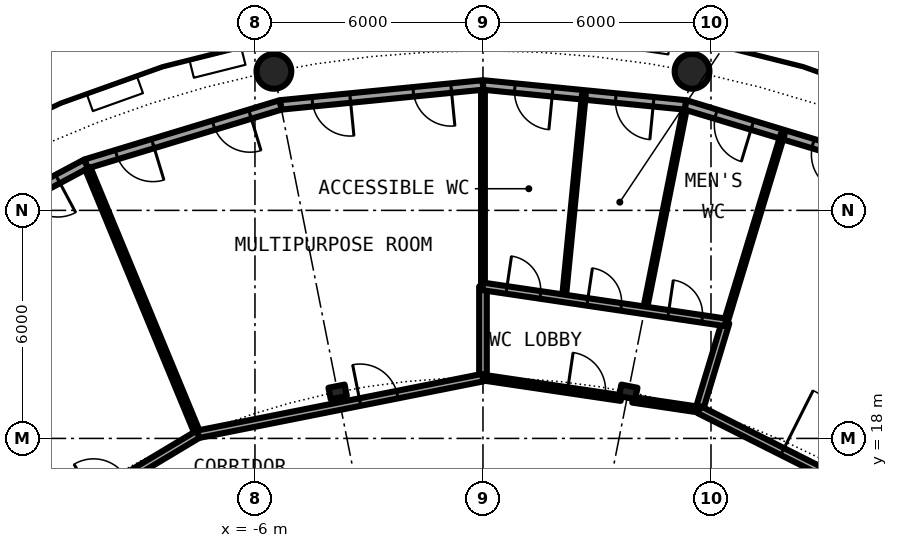
"""IFC4 building model, lengths in metres.
Left out: names, types, materials, properties, quantities, classifications, styles, units other than length and angle.
Written with IfcOpenShell. Run it as: python <this file> out.ifc"""

import sys

from ifc_helpers import new_model, si_unit, direction, frame, frame_2d, origin, origin_2d, place, context, subcontext, project, spatial, rectangle, hollow_circle, i_section, extrude, element, fill, save


model = new_model("IFC4")
c1 = context("Model", 3, precision=1e-05, world=origin(), true_north=direction((0.0, 1.0)))
c2 = subcontext(c1, "Body", "Model", "MODEL_VIEW")
j1 = project(units=[si_unit("LENGTHUNIT", "METRE"), si_unit("PLANEANGLEUNIT", "RADIAN")], contexts=[c1])
p1 = place(None, origin())
s1 = spatial("IfcSite", under=j1, at=p1, CompositionType="ELEMENT")
p2 = place(p1, origin())
s2 = spatial("IfcBuilding", under=s1, at=p2, CompositionType="ELEMENT")
p3 = place(p2, frame((0.0, 0.0, 107.45)))
s3 = spatial("IfcBuildingStorey", under=s2, at=p3, CompositionType="ELEMENT", Elevation=107.45)
for number, where, z_axis, x_axis in (
    (1, (5.501, 27.658, 0.0), (0.0, 0.0, 1.0), (1.0, 0.0, 0.0)),
    (2, (-5.501, 27.658, 0.0), (0.0, 0.0, 1.0), (1.0, 0.0, 0.0)),
):
    element("IfcColumn", number, at=place(p3, frame(where, z_axis=z_axis, x_axis=x_axis)), inside=s3, PredefinedType="COLUMN", context=c2, shape_type="SweptSolid", body=[
        extrude(hollow_circle(Radius=0.457, WallThickness=0.04, at=origin_2d()), origin(), (0.0, 0.0, 1.0), 4.2),
    ])
for number, where, z_axis, x_axis in (
    (3, (3.824, 19.223, 0.0), (0.0, 0.0, 1.0), (0.195, 0.981, 0.0)),
    (4, (-3.824, 19.223, 0.0), (0.0, 0.0, 1.0), (-0.195, 0.981, 0.0)),
):
    element("IfcColumn", number, at=place(p3, frame(where, z_axis=z_axis, x_axis=x_axis)), inside=s3, PredefinedType="COLUMN", context=c2, shape_type="SweptSolid", body=[
        extrude(i_section(OverallWidth=0.307, OverallDepth=0.432, WebThickness=0.021, FlangeThickness=0.04, FilletRadius=0.027, at=origin_2d()), origin(), (0.0, 0.0, 1.0), 4.2),
    ])
p4 = place(p3, frame((10.447, 25.222, 0.0), z_axis=(0.0, 0.0, 1.0), x_axis=(-0.956965678721, 0.290201119486, 0.0)))
e5 = element("IfcWall", 5, at=p4, inside=s3, PredefinedType="SOLIDWALL", context=c2, shape_type="SweptSolid", body=[
    extrude(rectangle(XDim=5.351, YDim=0.25, at=frame_2d((2.676, 0.0))), origin(), (0.0, 0.0, 1.0), 3.85),
])
p5 = place(p4, frame((0.841, 0.0, 0.0)))
e6 = element("IfcOpeningElement", 6, at=p5, cuts=e5, PredefinedType="OPENING", context=c2, shape_type="SweptSolid", body=[
    extrude(rectangle(XDim=1.0, YDim=2.2, at=frame_2d((0.5, 1.1))), frame((0.0, 0.135, 0.0), z_axis=(0.0, -1.0, 0.0), x_axis=(1.0, 0.0, 0.0)), (0.0, 0.0, 1.0), 0.27),
])
p6 = place(p4, frame((3.51, 0.0, 0.0)))
e7 = element("IfcOpeningElement", 7, at=p6, cuts=e5, PredefinedType="OPENING", context=c2, shape_type="SweptSolid", body=[
    extrude(rectangle(XDim=1.0, YDim=2.2, at=frame_2d((0.5, 1.1))), frame((0.0, 0.135, 0.0), z_axis=(0.0, -1.0, 0.0), x_axis=(1.0, 0.0, 0.0)), (0.0, 0.0, 1.0), 0.27),
])
p7 = place(p3, frame((5.326, 26.775, 0.0), z_axis=(0.0, 0.0, 1.0), x_axis=(-0.995173996315, 0.098126026407, 0.0)))
e8 = element("IfcWall", 8, at=p7, inside=s3, PredefinedType="SOLIDWALL", context=c2, shape_type="SweptSolid", body=[
    extrude(rectangle(XDim=5.352, YDim=0.25, at=frame_2d((2.676, 0.0))), origin(), (0.0, 0.0, 1.0), 3.85),
])
p8 = place(p7, frame((0.841, 0.0, 0.0)))
e9 = element("IfcOpeningElement", 9, at=p8, cuts=e8, PredefinedType="OPENING", context=c2, shape_type="SweptSolid", body=[
    extrude(rectangle(XDim=1.0, YDim=2.2, at=frame_2d((0.5, 1.1))), frame((0.0, 0.135, 0.0), z_axis=(0.0, -1.0, 0.0), x_axis=(1.0, 0.0, 0.0)), (0.0, 0.0, 1.0), 0.27),
])
p9 = place(p7, frame((3.51, 0.0, 0.0)))
e10 = element("IfcOpeningElement", 10, at=p9, cuts=e8, PredefinedType="OPENING", context=c2, shape_type="SweptSolid", body=[
    extrude(rectangle(XDim=1.0, YDim=2.2, at=frame_2d((0.5, 1.1))), frame((0.0, 0.135, 0.0), z_axis=(0.0, -1.0, 0.0), x_axis=(1.0, 0.0, 0.0)), (0.0, 0.0, 1.0), 0.27),
])
p10 = place(p3, frame((0.0, 27.3, 0.0), z_axis=(0.0, 0.0, 1.0), x_axis=(-0.995173996315, -0.098126026407, 0.0)))
e11 = element("IfcWall", 11, at=p10, inside=s3, PredefinedType="SOLIDWALL", context=c2, shape_type="SweptSolid", body=[
    extrude(rectangle(XDim=5.352, YDim=0.25, at=frame_2d((2.676, 0.0))), origin(), (0.0, 0.0, 1.0), 3.85),
])
p11 = place(p10, frame((0.841, 0.0, 0.0)))
e12 = element("IfcOpeningElement", 12, at=p11, cuts=e11, PredefinedType="OPENING", context=c2, shape_type="SweptSolid", body=[
    extrude(rectangle(XDim=1.0, YDim=2.2, at=frame_2d((0.5, 1.1))), frame((0.0, 0.135, 0.0), z_axis=(0.0, -1.0, 0.0), x_axis=(1.0, 0.0, 0.0)), (0.0, 0.0, 1.0), 0.27),
])
p12 = place(p10, frame((3.51, 0.0, 0.0)))
e13 = element("IfcOpeningElement", 13, at=p12, cuts=e11, PredefinedType="OPENING", context=c2, shape_type="SweptSolid", body=[
    extrude(rectangle(XDim=1.0, YDim=2.2, at=frame_2d((0.5, 1.1))), frame((0.0, 0.135, 0.0), z_axis=(0.0, -1.0, 0.0), x_axis=(1.0, 0.0, 0.0)), (0.0, 0.0, 1.0), 0.27),
])
p13 = place(p3, frame((-5.326, 26.775, 0.0), z_axis=(0.0, 0.0, 1.0), x_axis=(-0.956965678721, -0.290201119486, 0.0)))
e14 = element("IfcWall", 14, at=p13, inside=s3, PredefinedType="SOLIDWALL", context=c2, shape_type="SweptSolid", body=[
    extrude(rectangle(XDim=5.351, YDim=0.25, at=frame_2d((2.676, 0.0))), origin(), (0.0, 0.0, 1.0), 3.85),
])
p14 = place(p13, frame((0.841, 0.0, 0.0)))
e15 = element("IfcOpeningElement", 15, at=p14, cuts=e14, PredefinedType="OPENING", context=c2, shape_type="SweptSolid", body=[
    extrude(rectangle(XDim=1.0, YDim=2.2, at=frame_2d((0.5, 1.1))), frame((0.0, 0.135, 0.0), z_axis=(0.0, -1.0, 0.0), x_axis=(1.0, 0.0, 0.0)), (0.0, 0.0, 1.0), 0.27),
])
p15 = place(p13, frame((3.51, 0.0, 0.0)))
e16 = element("IfcOpeningElement", 16, at=p15, cuts=e14, PredefinedType="OPENING", context=c2, shape_type="SweptSolid", body=[
    extrude(rectangle(XDim=1.0, YDim=2.2, at=frame_2d((0.5, 1.1))), frame((0.0, 0.135, 0.0), z_axis=(0.0, -1.0, 0.0), x_axis=(1.0, 0.0, 0.0)), (0.0, 0.0, 1.0), 0.27),
])
p16 = place(p3, frame((-10.447, 25.222, 0.0), z_axis=(0.0, 0.0, 1.0), x_axis=(-0.881915646801, -0.471407246368, 0.0)))
e17 = element("IfcWall", 17, at=p16, inside=s3, PredefinedType="SOLIDWALL", context=c2, shape_type="SweptSolid", body=[
    extrude(rectangle(XDim=5.352, YDim=0.25, at=frame_2d((2.676, 0.0))), origin(), (0.0, 0.0, 1.0), 3.85),
])
p17 = place(p16, frame((0.841, 0.0, 0.0)))
e18 = element("IfcOpeningElement", 18, at=p17, cuts=e17, PredefinedType="OPENING", context=c2, shape_type="SweptSolid", body=[
    extrude(rectangle(XDim=1.0, YDim=2.2, at=frame_2d((0.5, 1.1))), frame((0.0, 0.135, 0.0), z_axis=(0.0, -1.0, 0.0), x_axis=(1.0, 0.0, 0.0)), (0.0, 0.0, 1.0), 0.27),
])
p18 = place(p16, frame((3.51, 0.0, 0.0)))
e19 = element("IfcOpeningElement", 19, at=p18, cuts=e17, PredefinedType="OPENING", context=c2, shape_type="SweptSolid", body=[
    extrude(rectangle(XDim=1.0, YDim=2.2, at=frame_2d((0.5, 1.1))), frame((0.0, 0.135, 0.0), z_axis=(0.0, -1.0, 0.0), x_axis=(1.0, 0.0, 0.0)), (0.0, 0.0, 1.0), 0.27),
])
p19 = place(p3, frame((-10.399, 25.106, 0.0), z_axis=(0.0, 0.0, 1.0), x_axis=(0.382600411313, -0.923913916587, 0.0)))
e20 = element("IfcWall", 20, at=p19, inside=s3, PredefinedType="PARTITIONING", context=c2, shape_type="SweptSolid", body=[
    extrude(rectangle(XDim=7.574, YDim=0.15, at=frame_2d((3.787, 0.0))), origin(), (0.0, 0.0, 1.0), 3.85),
])
p20 = place(p3, frame((0.0, 19.6, 0.0), z_axis=(0.0, 0.0, 1.0), x_axis=(0.0, 1.0, 0.0)))
e21 = element("IfcWall", 21, at=p20, inside=s3, PredefinedType="PARTITIONING", context=c2, shape_type="SweptSolid", body=[
    extrude(rectangle(XDim=2.4, YDim=0.2, at=frame_2d((1.2, 0.0))), origin(), (0.0, 0.0, 1.0), 3.85),
])
p21 = place(p3, frame((0.0, 22.0, 0.0), z_axis=(0.0, 0.0, 1.0), x_axis=(0.0, 1.0, 0.0)))
e22 = element("IfcWall", 22, at=p21, inside=s3, PredefinedType="PARTITIONING", context=c2, shape_type="SweptSolid", body=[
    extrude(rectangle(XDim=5.175, YDim=0.1, at=frame_2d((2.587, 0.0))), origin(), (0.0, 0.0, 1.0), 3.85),
])
p22 = place(p3, frame((2.129, 21.684, 0.0), z_axis=(0.0, 0.0, 1.0), x_axis=(0.09767265114, 0.995218595696, 0.0)))
e23 = element("IfcWall", 23, at=p22, inside=s3, PredefinedType="PARTITIONING", context=c2, shape_type="SweptSolid", body=[
    extrude(rectangle(XDim=5.386, YDim=0.1, at=frame_2d((2.693, 0.0))), origin(), (0.0, 0.0, 1.0), 3.85),
])
p23 = place(p3, frame((4.258, 21.368, 0.0), z_axis=(0.0, 0.0, 1.0), x_axis=(0.195296766469, 0.980744193461, 0.0)))
e24 = element("IfcWall", 24, at=p23, inside=s3, PredefinedType="PARTITIONING", context=c2, shape_type="SweptSolid", body=[
    extrude(rectangle(XDim=5.387, YDim=0.1, at=frame_2d((2.693, 0.0))), origin(), (0.0, 0.0, 1.0), 3.85),
])
p24 = place(p3, frame((5.69, 18.756, 0.0), z_axis=(0.0, 0.0, 1.0), x_axis=(0.290015865164, 0.957021837762, 0.0)))
e25 = element("IfcWall", 25, at=p24, inside=s3, PredefinedType="PARTITIONING", context=c2, shape_type="SweptSolid", body=[
    extrude(rectangle(XDim=2.4, YDim=0.2, at=frame_2d((1.2, 0.0))), origin(), (0.0, 0.0, 1.0), 3.85),
])
p25 = place(p3, frame((6.386, 21.053, 0.0), z_axis=(0.0, 0.0, 1.0), x_axis=(0.29025094386, 0.956950567996, 0.0)))
e26 = element("IfcWall", 26, at=p25, inside=s3, PredefinedType="PARTITIONING", context=c2, shape_type="SweptSolid", body=[
    extrude(rectangle(XDim=5.175, YDim=0.1, at=frame_2d((2.587, 0.0))), origin(), (0.0, 0.0, 1.0), 3.85),
])
p26 = place(p3, frame((-7.501, 18.108, 0.0), z_axis=(0.0, 0.0, 1.0), x_axis=(0.980781515054, 0.195109250749, 0.0)))
e27 = element("IfcWall", 27, at=p26, inside=s3, PredefinedType="PARTITIONING", context=c2, shape_type="SweptSolid", body=[
    extrude(rectangle(XDim=7.648, YDim=0.2, at=frame_2d((3.824, 0.0))), origin(), (0.0, 0.0, 1.0), 3.54),
])
p27 = place(p26, frame((4.35, 0.0, 0.0)))
e28 = element("IfcOpeningElement", 28, at=p27, cuts=e27, PredefinedType="OPENING", context=c2, shape_type="SweptSolid", body=[
    extrude(rectangle(XDim=1.0, YDim=2.3, at=frame_2d((0.5, 1.15))), frame((0.0, 0.11, 0.0), z_axis=(0.0, -1.0, 0.0), x_axis=(1.0, 0.0, 0.0)), (0.0, 0.0, 1.0), 0.22),
])
p28 = place(p3, frame((5.69, 18.756, 0.0), z_axis=(0.0, 0.0, 1.0), x_axis=(0.893207084241, -0.449645532239, 0.0)))
e29 = element("IfcWall", 29, at=p28, inside=s3, PredefinedType="PARTITIONING", context=c2, shape_type="SweptSolid", body=[
    extrude(rectangle(XDim=5.578, YDim=0.2, at=frame_2d((2.789, 0.0))), origin(), (0.0, 0.0, 1.0), 3.54),
])
p29 = place(p28, frame((2.451, 0.0, 0.0)))
e30 = element("IfcOpeningElement", 30, at=p29, cuts=e29, PredefinedType="OPENING", context=c2, shape_type="SweptSolid", body=[
    extrude(rectangle(XDim=1.8, YDim=2.3, at=frame_2d((0.9, 1.15))), frame((0.0, 0.11, 0.0), z_axis=(0.0, -1.0, 0.0), x_axis=(1.0, 0.0, 0.0)), (0.0, 0.0, 1.0), 0.22),
])
p30 = place(p3, frame((-10.653, 16.219, 0.0), z_axis=(0.0, 0.0, 1.0), x_axis=(0.857774179698, 0.514026708103, 0.0)))
e31 = element("IfcWall", 31, at=p30, inside=s3, PredefinedType="PARTITIONING", context=c2, shape_type="SweptSolid", body=[
    extrude(rectangle(XDim=3.675, YDim=0.2, at=frame_2d((1.837, 0.0))), origin(), (0.0, 0.0, 1.0), 3.54),
])
p31 = place(p30, frame((0.473, 0.0, 0.0)))
e32 = element("IfcOpeningElement", 32, at=p31, cuts=e31, PredefinedType="OPENING", context=c2, shape_type="SweptSolid", body=[
    extrude(rectangle(XDim=1.0, YDim=2.3, at=frame_2d((0.5, 1.15))), frame((0.0, 0.11, 0.0), z_axis=(0.0, -1.0, 0.0), x_axis=(1.0, 0.0, 0.0)), (0.0, 0.0, 1.0), 0.22),
])
p32 = place(p3, frame((0.0, 19.6, 0.0), z_axis=(0.0, 0.0, 1.0), x_axis=(0.989182049247, -0.146693126787, 0.0)))
e33 = element("IfcWall", 33, at=p32, inside=s3, PredefinedType="PARTITIONING", context=c2, shape_type="SweptSolid", body=[
    extrude(rectangle(XDim=3.675, YDim=0.15, at=frame_2d((1.837, 0.0))), origin(), (0.0, 0.0, 1.0), 3.54),
])
p33 = place(p32, frame((2.25, 0.0, 0.0)))
e34 = element("IfcOpeningElement", 34, at=p33, cuts=e33, PredefinedType="OPENING", context=c2, shape_type="SweptSolid", body=[
    extrude(rectangle(XDim=1.0, YDim=2.3, at=frame_2d((0.5, 1.15))), frame((0.0, 0.085, 0.0), z_axis=(0.0, -1.0, 0.0), x_axis=(1.0, 0.0, 0.0)), (0.0, 0.0, 1.0), 0.17),
])
p34 = place(p3, frame((3.939, 19.016, 0.0), z_axis=(0.0, 0.0, 1.0), x_axis=(0.989153791914, -0.146883545509, 0.0)))
e35 = element("IfcWall", 35, at=p34, inside=s3, PredefinedType="PARTITIONING", context=c2, shape_type="SweptSolid", body=[
    extrude(rectangle(XDim=1.77, YDim=0.15, at=frame_2d((0.885, 0.0))), origin(), (0.0, 0.0, 1.0), 3.54),
])
p35 = place(p3, frame((-0.009, 22.0, 0.0), z_axis=(0.0, 0.0, 1.0), x_axis=(0.989212179465, -0.146489808511, 0.0)))
e36 = element("IfcWall", 36, at=p35, inside=s3, PredefinedType="PARTITIONING", context=c2, shape_type="SweptSolid", body=[
    extrude(rectangle(XDim=6.465, YDim=0.2, at=frame_2d((3.232, 0.0))), origin(), (0.0, 0.0, 1.0), 3.85),
])
p36 = place(p35, frame((4.939, 0.0, 0.0)))
e37 = element("IfcOpeningElement", 37, at=p36, cuts=e36, PredefinedType="OPENING", context=c2, shape_type="SweptSolid", body=[
    extrude(rectangle(XDim=0.9, YDim=2.3, at=frame_2d((0.45, 1.15))), frame((0.0, 0.11, 0.0), z_axis=(0.0, -1.0, 0.0), x_axis=(1.0, 0.0, 0.0)), (0.0, 0.0, 1.0), 0.22),
])
p37 = place(p35, frame((2.787, 0.0, 0.0)))
e38 = element("IfcOpeningElement", 38, at=p37, cuts=e36, PredefinedType="OPENING", context=c2, shape_type="SweptSolid", body=[
    extrude(rectangle(XDim=0.9, YDim=2.3, at=frame_2d((0.45, 1.15))), frame((0.0, 0.11, 0.0), z_axis=(0.0, -1.0, 0.0), x_axis=(1.0, 0.0, 0.0)), (0.0, 0.0, 1.0), 0.22),
])
p38 = place(p35, frame((0.635, 0.0, 0.0)))
e39 = element("IfcOpeningElement", 39, at=p38, cuts=e36, PredefinedType="OPENING", context=c2, shape_type="SweptSolid", body=[
    extrude(rectangle(XDim=0.9, YDim=2.3, at=frame_2d((0.45, 1.15))), frame((0.0, 0.11, 0.0), z_axis=(0.0, -1.0, 0.0), x_axis=(1.0, 0.0, 0.0)), (0.0, 0.0, 1.0), 0.22),
])
p39 = place(p5, origin())
e40 = element("IfcDoor", 40, at=p39, inside=s3, OperationType="SINGLE_SWING_LEFT", PredefinedType="DOOR", context=c2, shape_type="SweptSolid", body=[
    extrude(rectangle(XDim=1.0, YDim=2.2, at=frame_2d((0.5, 1.1))), frame((0.0, 0.025, 0.0), z_axis=(0.0, -1.0, 0.0), x_axis=(1.0, 0.0, 0.0)), (0.0, 0.0, 1.0), 0.05),
])
fill(e6, e40)
p40 = place(p6, origin())
e41 = element("IfcDoor", 41, at=p40, inside=s3, OperationType="SINGLE_SWING_LEFT", PredefinedType="DOOR", context=c2, shape_type="SweptSolid", body=[
    extrude(rectangle(XDim=1.0, YDim=2.2, at=frame_2d((0.5, 1.1))), frame((0.0, 0.025, 0.0), z_axis=(0.0, -1.0, 0.0), x_axis=(1.0, 0.0, 0.0)), (0.0, 0.0, 1.0), 0.05),
])
fill(e7, e41)
p41 = place(p8, origin())
e42 = element("IfcDoor", 42, at=p41, inside=s3, OperationType="SINGLE_SWING_LEFT", PredefinedType="DOOR", context=c2, shape_type="SweptSolid", body=[
    extrude(rectangle(XDim=1.0, YDim=2.2, at=frame_2d((0.5, 1.1))), frame((0.0, 0.025, 0.0), z_axis=(0.0, -1.0, 0.0), x_axis=(1.0, 0.0, 0.0)), (0.0, 0.0, 1.0), 0.05),
])
fill(e9, e42)
p42 = place(p9, origin())
e43 = element("IfcDoor", 43, at=p42, inside=s3, OperationType="SINGLE_SWING_LEFT", PredefinedType="DOOR", context=c2, shape_type="SweptSolid", body=[
    extrude(rectangle(XDim=1.0, YDim=2.2, at=frame_2d((0.5, 1.1))), frame((0.0, 0.025, 0.0), z_axis=(0.0, -1.0, 0.0), x_axis=(1.0, 0.0, 0.0)), (0.0, 0.0, 1.0), 0.05),
])
fill(e10, e43)
p43 = place(p11, origin())
e44 = element("IfcDoor", 44, at=p43, inside=s3, OperationType="SINGLE_SWING_LEFT", PredefinedType="DOOR", context=c2, shape_type="SweptSolid", body=[
    extrude(rectangle(XDim=1.0, YDim=2.2, at=frame_2d((0.5, 1.1))), frame((0.0, 0.025, 0.0), z_axis=(0.0, -1.0, 0.0), x_axis=(1.0, 0.0, 0.0)), (0.0, 0.0, 1.0), 0.05),
])
fill(e12, e44)
p44 = place(p12, origin())
e45 = element("IfcDoor", 45, at=p44, inside=s3, OperationType="SINGLE_SWING_LEFT", PredefinedType="DOOR", context=c2, shape_type="SweptSolid", body=[
    extrude(rectangle(XDim=1.0, YDim=2.2, at=frame_2d((0.5, 1.1))), frame((0.0, 0.025, 0.0), z_axis=(0.0, -1.0, 0.0), x_axis=(1.0, 0.0, 0.0)), (0.0, 0.0, 1.0), 0.05),
])
fill(e13, e45)
p45 = place(p14, origin())
e46 = element("IfcDoor", 46, at=p45, inside=s3, OperationType="SINGLE_SWING_LEFT", PredefinedType="DOOR", context=c2, shape_type="SweptSolid", body=[
    extrude(rectangle(XDim=1.0, YDim=2.2, at=frame_2d((0.5, 1.1))), frame((0.0, 0.025, 0.0), z_axis=(0.0, -1.0, 0.0), x_axis=(1.0, 0.0, 0.0)), (0.0, 0.0, 1.0), 0.05),
])
fill(e15, e46)
p46 = place(p15, origin())
e47 = element("IfcDoor", 47, at=p46, inside=s3, OperationType="SINGLE_SWING_LEFT", PredefinedType="DOOR", context=c2, shape_type="SweptSolid", body=[
    extrude(rectangle(XDim=1.0, YDim=2.2, at=frame_2d((0.5, 1.1))), frame((0.0, 0.025, 0.0), z_axis=(0.0, -1.0, 0.0), x_axis=(1.0, 0.0, 0.0)), (0.0, 0.0, 1.0), 0.05),
])
fill(e16, e47)
p47 = place(p17, origin())
e48 = element("IfcDoor", 48, at=p47, inside=s3, OperationType="SINGLE_SWING_LEFT", PredefinedType="DOOR", context=c2, shape_type="SweptSolid", body=[
    extrude(rectangle(XDim=1.0, YDim=2.2, at=frame_2d((0.5, 1.1))), frame((0.0, 0.025, 0.0), z_axis=(0.0, -1.0, 0.0), x_axis=(1.0, 0.0, 0.0)), (0.0, 0.0, 1.0), 0.05),
])
fill(e18, e48)
p48 = place(p33, origin())
e49 = element("IfcDoor", 49, at=p48, inside=s3, OperationType="SINGLE_SWING_RIGHT", PredefinedType="DOOR", context=c2, shape_type="SweptSolid", body=[
    extrude(rectangle(XDim=1.0, YDim=2.3, at=frame_2d((0.5, 1.15))), frame((0.0, 0.025, 0.0), z_axis=(0.0, -1.0, 0.0), x_axis=(1.0, 0.0, 0.0)), (0.0, 0.0, 1.0), 0.05),
])
fill(e34, e49)
p49 = place(p36, origin())
e50 = element("IfcDoor", 50, at=p49, inside=s3, OperationType="SINGLE_SWING_RIGHT", PredefinedType="DOOR", context=c2, shape_type="SweptSolid", body=[
    extrude(rectangle(XDim=0.9, YDim=2.3, at=frame_2d((0.45, 1.15))), frame((0.0, 0.025, 0.0), z_axis=(0.0, -1.0, 0.0), x_axis=(1.0, 0.0, 0.0)), (0.0, 0.0, 1.0), 0.05),
])
fill(e37, e50)
p50 = place(p37, origin())
e51 = element("IfcDoor", 51, at=p50, inside=s3, OperationType="SINGLE_SWING_RIGHT", PredefinedType="DOOR", context=c2, shape_type="SweptSolid", body=[
    extrude(rectangle(XDim=0.9, YDim=2.3, at=frame_2d((0.45, 1.15))), frame((0.0, 0.025, 0.0), z_axis=(0.0, -1.0, 0.0), x_axis=(1.0, 0.0, 0.0)), (0.0, 0.0, 1.0), 0.05),
])
fill(e38, e51)
p51 = place(p38, origin())
e52 = element("IfcDoor", 52, at=p51, inside=s3, OperationType="SINGLE_SWING_LEFT", PredefinedType="DOOR", context=c2, shape_type="SweptSolid", body=[
    extrude(rectangle(XDim=0.9, YDim=2.3, at=frame_2d((0.45, 1.15))), frame((0.0, 0.025, 0.0), z_axis=(0.0, -1.0, 0.0), x_axis=(1.0, 0.0, 0.0)), (0.0, 0.0, 1.0), 0.05),
])
fill(e39, e52)
p52 = place(p29, origin())
e53 = element("IfcDoor", 53, at=p52, inside=s3, OperationType="DOUBLE_DOOR_SINGLE_SWING", PredefinedType="DOOR", context=c2, shape_type="SweptSolid", body=[
    extrude(rectangle(XDim=1.8, YDim=2.3, at=frame_2d((0.9, 1.15))), frame((0.0, 0.025, 0.0), z_axis=(0.0, -1.0, 0.0), x_axis=(1.0, 0.0, 0.0)), (0.0, 0.0, 1.0), 0.05),
])
fill(e30, e53)
p53 = place(p27, origin())
e54 = element("IfcDoor", 54, at=p53, inside=s3, OperationType="SINGLE_SWING_RIGHT", PredefinedType="DOOR", context=c2, shape_type="SweptSolid", body=[
    extrude(rectangle(XDim=1.0, YDim=2.3, at=frame_2d((0.5, 1.15))), frame((0.0, 0.025, 0.0), z_axis=(0.0, -1.0, 0.0), x_axis=(1.0, 0.0, 0.0)), (0.0, 0.0, 1.0), 0.05),
])
fill(e28, e54)
save(model, sys.argv[1])
